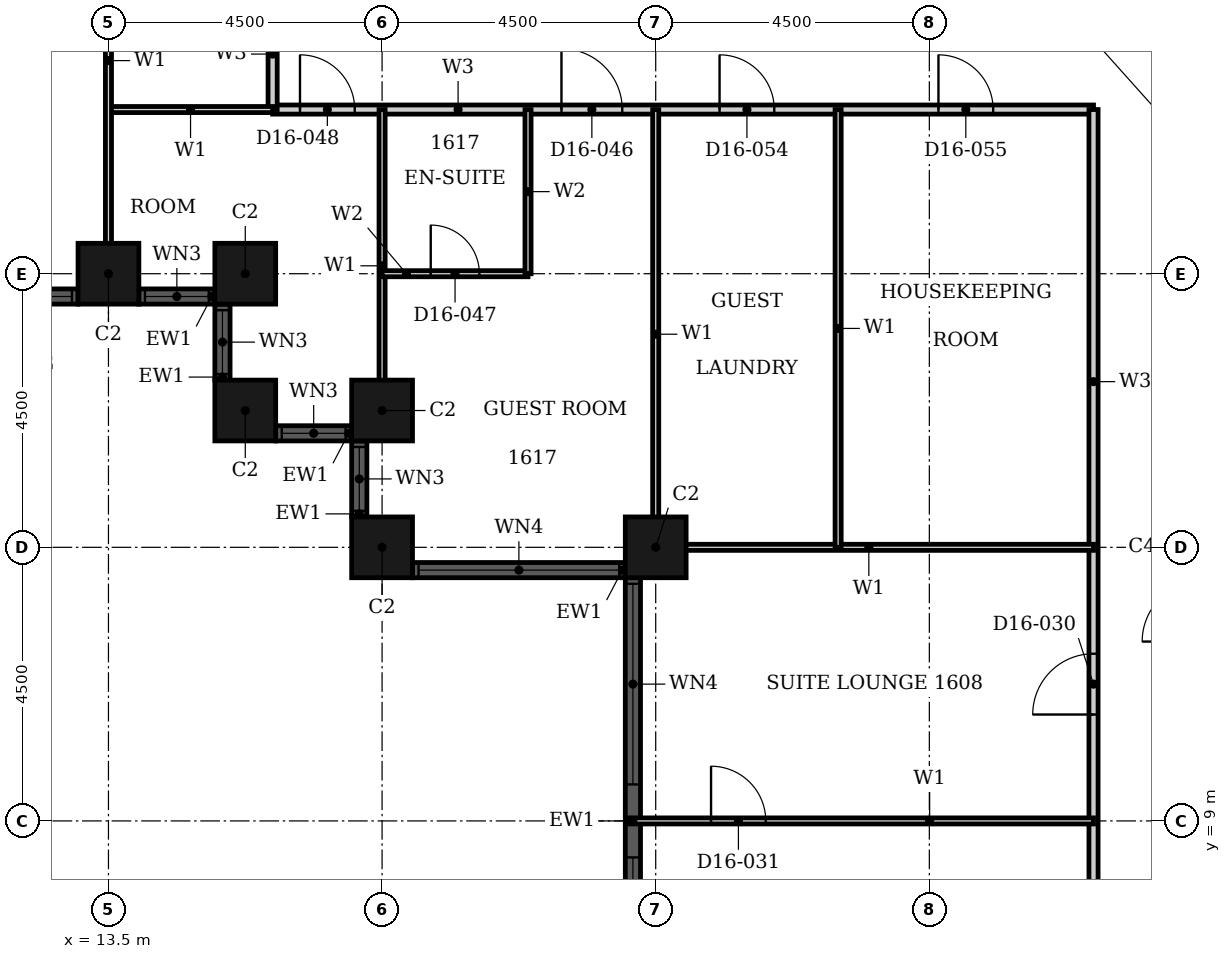
"""IFC4 building model, lengths in metres.
Left out: names, types, materials, properties, quantities, classifications, styles, units other than length and angle.
Written with IfcOpenShell. Run it as: python <this file> out.ifc"""

import sys

from ifc_helpers import new_model, si_unit, direction, frame, frame_2d, origin, origin_2d, place, context, subcontext, project, spatial, rectangle, hollow_rectangle, extrude, element, fill, save


model = new_model("IFC4")
c1 = context("Model", 3, precision=1e-05, world=origin(), true_north=direction((0.0, 1.0)))
c2 = subcontext(c1, "Body", "Model", "MODEL_VIEW")
j1 = project(units=[si_unit("LENGTHUNIT", "METRE"), si_unit("PLANEANGLEUNIT", "RADIAN")], contexts=[c1])
p1 = place(None, origin())
s1 = spatial("IfcSite", under=j1, at=p1, CompositionType="ELEMENT")
p2 = place(p1, origin())
s2 = spatial("IfcBuilding", under=s1, at=p2, CompositionType="ELEMENT")
p3 = place(p2, frame((0.0, 0.0, 70.8)))
s3 = spatial("IfcBuildingStorey", under=s2, at=p3, CompositionType="ELEMENT", Elevation=70.8)
for number, where, z_axis, x_axis in (
    (1, (13.5, 18.0, 0.0), (0.0, 0.0, 1.0), (1.0, 0.0, 0.0)),
    (2, (15.75, 18.0, 0.0), (0.0, 0.0, 1.0), (1.0, 0.0, 0.0)),
    (3, (15.75, 15.75, 0.0), (0.0, 0.0, 1.0), (1.0, 0.0, 0.0)),
    (4, (18.0, 15.75, 0.0), (0.0, 0.0, 1.0), (1.0, 0.0, 0.0)),
    (5, (18.0, 13.5, 0.0), (0.0, 0.0, 1.0), (1.0, 0.0, 0.0)),
    (6, (22.5, 13.5, 0.0), (0.0, 0.0, 1.0), (1.0, 0.0, 0.0)),
):
    element("IfcColumn", number, at=place(p3, frame(where, z_axis=z_axis, x_axis=x_axis)), inside=s3, PredefinedType="COLUMN", context=c2, shape_type="SweptSolid", body=[
        extrude(hollow_rectangle(XDim=1.0, YDim=1.0, WallThickness=0.032, at=origin_2d()), origin(), (0.0, 0.0, 1.0), 3.6),
    ])
p4 = place(p3, frame((5.0, 17.625, 0.0), z_axis=(0.0, 0.0, 1.0), x_axis=(1.0, 0.0, 0.0)))
e7 = element("IfcWall", 7, at=p4, inside=s3, PredefinedType="SOLIDWALL", context=c2, shape_type="SweptSolid", body=[
    extrude(rectangle(XDim=8.0, YDim=0.25, at=frame_2d((4.0, 0.0))), origin(), (0.0, 0.0, 1.0), 3.6),
])
p5 = place(p4, frame((0.1, 0.0, 0.9)))
e8 = element("IfcOpeningElement", 8, at=p5, cuts=e7, PredefinedType="OPENING", context=c2, shape_type="SweptSolid", body=[
    extrude(rectangle(XDim=3.3, YDim=2.08, at=frame_2d((1.65, 1.04))), frame((0.0, 0.135, 0.0), z_axis=(0.0, -1.0, 0.0), x_axis=(1.0, 0.0, 0.0)), (0.0, 0.0, 1.0), 0.27),
])
p6 = place(p4, frame((4.6, 0.0, 0.9)))
e9 = element("IfcOpeningElement", 9, at=p6, cuts=e7, PredefinedType="OPENING", context=c2, shape_type="SweptSolid", body=[
    extrude(rectangle(XDim=3.3, YDim=2.08, at=frame_2d((1.65, 1.04))), frame((0.0, 0.135, 0.0), z_axis=(0.0, -1.0, 0.0), x_axis=(1.0, 0.0, 0.0)), (0.0, 0.0, 1.0), 0.27),
])
p7 = place(p3, frame((14.0, 17.625, 0.0), z_axis=(0.0, 0.0, 1.0), x_axis=(1.0, 0.0, 0.0)))
e10 = element("IfcWall", 10, at=p7, inside=s3, PredefinedType="SOLIDWALL", context=c2, shape_type="SweptSolid", body=[
    extrude(rectangle(XDim=1.25, YDim=0.25, at=frame_2d((0.625, 0.0))), origin(), (0.0, 0.0, 1.0), 3.6),
])
p8 = place(p7, frame((0.1, 0.0, 0.9)))
e11 = element("IfcOpeningElement", 11, at=p8, cuts=e10, PredefinedType="OPENING", context=c2, shape_type="SweptSolid", body=[
    extrude(rectangle(XDim=1.05, YDim=2.08, at=frame_2d((0.525, 1.04))), frame((0.0, 0.135, 0.0), z_axis=(0.0, -1.0, 0.0), x_axis=(1.0, 0.0, 0.0)), (0.0, 0.0, 1.0), 0.27),
])
p9 = place(p3, frame((15.375, 17.5, 0.0), z_axis=(0.0, 0.0, 1.0), x_axis=(0.0, -1.0, 0.0)))
e12 = element("IfcWall", 12, at=p9, inside=s3, PredefinedType="SOLIDWALL", context=c2, shape_type="SweptSolid", body=[
    extrude(rectangle(XDim=1.25, YDim=0.25, at=frame_2d((0.625, 0.0))), origin(), (0.0, 0.0, 1.0), 3.6),
])
p10 = place(p9, frame((0.1, 0.0, 0.9)))
e13 = element("IfcOpeningElement", 13, at=p10, cuts=e12, PredefinedType="OPENING", context=c2, shape_type="SweptSolid", body=[
    extrude(rectangle(XDim=1.05, YDim=2.08, at=frame_2d((0.525, 1.04))), frame((0.0, 0.135, 0.0), z_axis=(0.0, -1.0, 0.0), x_axis=(1.0, 0.0, 0.0)), (0.0, 0.0, 1.0), 0.27),
])
p11 = place(p3, frame((16.25, 15.375, 0.0), z_axis=(0.0, 0.0, 1.0), x_axis=(1.0, 0.0, 0.0)))
e14 = element("IfcWall", 14, at=p11, inside=s3, PredefinedType="SOLIDWALL", context=c2, shape_type="SweptSolid", body=[
    extrude(rectangle(XDim=1.25, YDim=0.25, at=frame_2d((0.625, 0.0))), origin(), (0.0, 0.0, 1.0), 3.6),
])
p12 = place(p11, frame((0.1, 0.0, 0.9)))
e15 = element("IfcOpeningElement", 15, at=p12, cuts=e14, PredefinedType="OPENING", context=c2, shape_type="SweptSolid", body=[
    extrude(rectangle(XDim=1.05, YDim=2.08, at=frame_2d((0.525, 1.04))), frame((0.0, 0.135, 0.0), z_axis=(0.0, -1.0, 0.0), x_axis=(1.0, 0.0, 0.0)), (0.0, 0.0, 1.0), 0.27),
])
p13 = place(p3, frame((17.625, 15.25, 0.0), z_axis=(0.0, 0.0, 1.0), x_axis=(0.0, -1.0, 0.0)))
e16 = element("IfcWall", 16, at=p13, inside=s3, PredefinedType="SOLIDWALL", context=c2, shape_type="SweptSolid", body=[
    extrude(rectangle(XDim=1.25, YDim=0.25, at=frame_2d((0.625, 0.0))), origin(), (0.0, 0.0, 1.0), 3.6),
])
p14 = place(p13, frame((0.1, 0.0, 0.9)))
e17 = element("IfcOpeningElement", 17, at=p14, cuts=e16, PredefinedType="OPENING", context=c2, shape_type="SweptSolid", body=[
    extrude(rectangle(XDim=1.05, YDim=2.08, at=frame_2d((0.525, 1.04))), frame((0.0, 0.135, 0.0), z_axis=(0.0, -1.0, 0.0), x_axis=(1.0, 0.0, 0.0)), (0.0, 0.0, 1.0), 0.27),
])
p15 = place(p3, frame((18.5, 13.125, 0.0), z_axis=(0.0, 0.0, 1.0), x_axis=(1.0, 0.0, 0.0)))
e18 = element("IfcWall", 18, at=p15, inside=s3, PredefinedType="SOLIDWALL", context=c2, shape_type="SweptSolid", body=[
    extrude(rectangle(XDim=3.5, YDim=0.25, at=frame_2d((1.75, 0.0))), origin(), (0.0, 0.0, 1.0), 3.6),
])
p16 = place(p15, frame((0.1, 0.0, 0.9)))
e19 = element("IfcOpeningElement", 19, at=p16, cuts=e18, PredefinedType="OPENING", context=c2, shape_type="SweptSolid", body=[
    extrude(rectangle(XDim=3.3, YDim=2.08, at=frame_2d((1.65, 1.04))), frame((0.0, 0.135, 0.0), z_axis=(0.0, -1.0, 0.0), x_axis=(1.0, 0.0, 0.0)), (0.0, 0.0, 1.0), 0.27),
])
p17 = place(p3, frame((22.125, 13.0, 0.0), z_axis=(0.0, 0.0, 1.0), x_axis=(0.0, -1.0, 0.0)))
e20 = element("IfcWall", 20, at=p17, inside=s3, PredefinedType="SOLIDWALL", context=c2, shape_type="SweptSolid", body=[
    extrude(rectangle(XDim=8.0, YDim=0.25, at=frame_2d((4.0, 0.0))), origin(), (0.0, 0.0, 1.0), 3.6),
])
p18 = place(p17, frame((0.1, 0.0, 0.9)))
e21 = element("IfcOpeningElement", 21, at=p18, cuts=e20, PredefinedType="OPENING", context=c2, shape_type="SweptSolid", body=[
    extrude(rectangle(XDim=3.3, YDim=2.08, at=frame_2d((1.65, 1.04))), frame((0.0, 0.135, 0.0), z_axis=(0.0, -1.0, 0.0), x_axis=(1.0, 0.0, 0.0)), (0.0, 0.0, 1.0), 0.27),
])
p19 = place(p17, frame((4.6, 0.0, 0.9)))
e22 = element("IfcOpeningElement", 22, at=p19, cuts=e20, PredefinedType="OPENING", context=c2, shape_type="SweptSolid", body=[
    extrude(rectangle(XDim=3.3, YDim=2.08, at=frame_2d((1.65, 1.04))), frame((0.0, 0.135, 0.0), z_axis=(0.0, -1.0, 0.0), x_axis=(1.0, 0.0, 0.0)), (0.0, 0.0, 1.0), 0.27),
])
p20 = place(p3, frame((16.2, 20.7, 0.0), z_axis=(0.0, 0.0, 1.0), x_axis=(1.0, 0.0, 0.0)))
e23 = element("IfcWall", 23, at=p20, inside=s3, PredefinedType="PARTITIONING", context=c2, shape_type="SweptSolid", body=[
    extrude(rectangle(XDim=13.5, YDim=0.15, at=frame_2d((6.75, 0.0))), origin(), (0.0, 0.0, 1.0), 3.3),
])
p21 = place(p20, frame((4.75, 0.0, 0.0)))
e24 = element("IfcOpeningElement", 24, at=p21, cuts=e23, PredefinedType="OPENING", context=c2, shape_type="SweptSolid", body=[
    extrude(rectangle(XDim=1.0, YDim=2.1, at=frame_2d((0.5, 1.05))), frame((0.0, 0.085, 0.0), z_axis=(0.0, -1.0, 0.0), x_axis=(1.0, 0.0, 0.0)), (0.0, 0.0, 1.0), 0.17),
])
p22 = place(p20, frame((0.45, 0.0, 0.0)))
e25 = element("IfcOpeningElement", 25, at=p22, cuts=e23, PredefinedType="OPENING", context=c2, shape_type="SweptSolid", body=[
    extrude(rectangle(XDim=0.9, YDim=2.1, at=frame_2d((0.45, 1.05))), frame((0.0, 0.085, 0.0), z_axis=(0.0, -1.0, 0.0), x_axis=(1.0, 0.0, 0.0)), (0.0, 0.0, 1.0), 0.17),
])
p23 = place(p20, frame((7.35, 0.0, 0.0)))
e26 = element("IfcOpeningElement", 26, at=p23, cuts=e23, PredefinedType="OPENING", context=c2, shape_type="SweptSolid", body=[
    extrude(rectangle(XDim=0.9, YDim=2.1, at=frame_2d((0.45, 1.05))), frame((0.0, 0.085, 0.0), z_axis=(0.0, -1.0, 0.0), x_axis=(1.0, 0.0, 0.0)), (0.0, 0.0, 1.0), 0.17),
])
p24 = place(p20, frame((10.95, 0.0, 0.0)))
e27 = element("IfcOpeningElement", 27, at=p24, cuts=e23, PredefinedType="OPENING", context=c2, shape_type="SweptSolid", body=[
    extrude(rectangle(XDim=0.9, YDim=2.1, at=frame_2d((0.45, 1.05))), frame((0.0, 0.085, 0.0), z_axis=(0.0, -1.0, 0.0), x_axis=(1.0, 0.0, 0.0)), (0.0, 0.0, 1.0), 0.17),
])
p25 = place(p3, frame((16.2, 20.7, 0.0), z_axis=(0.0, 0.0, 1.0), x_axis=(0.0, 1.0, 0.0)))
e28 = element("IfcWall", 28, at=p25, inside=s3, PredefinedType="PARTITIONING", context=c2, shape_type="SweptSolid", body=[
    extrude(rectangle(XDim=4.5, YDim=0.15, at=frame_2d((2.25, 0.0))), origin(), (0.0, 0.0, 1.0), 3.3),
])
p26 = place(p25, frame((1.825, 0.0, 0.0)))
e29 = element("IfcOpeningElement", 29, at=p26, cuts=e28, PredefinedType="OPENING", context=c2, shape_type="SweptSolid", body=[
    extrude(rectangle(XDim=0.95, YDim=2.1, at=frame_2d((0.475, 1.05))), frame((0.0, 0.085, 0.0), z_axis=(0.0, -1.0, 0.0), x_axis=(1.0, 0.0, 0.0)), (0.0, 0.0, 1.0), 0.17),
])
p27 = place(p3, frame((29.7, 4.5, 0.0), z_axis=(0.0, 0.0, 1.0), x_axis=(0.0, 1.0, 0.0)))
e30 = element("IfcWall", 30, at=p27, inside=s3, PredefinedType="PARTITIONING", context=c2, shape_type="SweptSolid", body=[
    extrude(rectangle(XDim=16.2, YDim=0.15, at=frame_2d((8.1, 0.0))), origin(), (0.0, 0.0, 1.0), 3.3),
])
p28 = place(p27, frame((6.25, 0.0, 0.0)))
e31 = element("IfcOpeningElement", 31, at=p28, cuts=e30, PredefinedType="OPENING", context=c2, shape_type="SweptSolid", body=[
    extrude(rectangle(XDim=1.0, YDim=2.1, at=frame_2d((0.5, 1.05))), frame((0.0, 0.085, 0.0), z_axis=(0.0, -1.0, 0.0), x_axis=(1.0, 0.0, 0.0)), (0.0, 0.0, 1.0), 0.17),
])
p29 = place(p3, frame((22.31, 13.5, 0.0), z_axis=(0.0, 0.0, 1.0), x_axis=(1.0, 0.0, 0.0)))
e32 = element("IfcWall", 32, at=p29, inside=s3, PredefinedType="PARTITIONING", context=c2, shape_type="SweptSolid", body=[
    extrude(rectangle(XDim=7.39, YDim=0.1, at=frame_2d((3.695, 0.0))), origin(), (0.0, 0.0, 1.0), 2.38),
])
p30 = place(p3, frame((13.5, 20.7, 0.0), z_axis=(0.0, 0.0, 1.0), x_axis=(1.0, 0.0, 0.0)))
e33 = element("IfcWall", 33, at=p30, inside=s3, PredefinedType="PARTITIONING", context=c2, shape_type="SweptSolid", body=[
    extrude(rectangle(XDim=2.7, YDim=0.1, at=frame_2d((1.35, 0.0))), origin(), (0.0, 0.0, 1.0), 3.3),
])
p31 = place(p3, frame((22.06, 9.0, 0.0), z_axis=(0.0, 0.0, 1.0), x_axis=(1.0, 0.0, 0.0)))
e34 = element("IfcWall", 34, at=p31, inside=s3, PredefinedType="PARTITIONING", context=c2, shape_type="SweptSolid", body=[
    extrude(rectangle(XDim=7.64, YDim=0.1, at=frame_2d((3.82, 0.0))), origin(), (0.0, 0.0, 1.0), 3.3),
])
p32 = place(p31, frame((1.35, 0.0, 0.0)))
e35 = element("IfcOpeningElement", 35, at=p32, cuts=e34, PredefinedType="OPENING", context=c2, shape_type="SweptSolid", body=[
    extrude(rectangle(XDim=0.9, YDim=2.1, at=frame_2d((0.45, 1.05))), frame((0.0, 0.06, 0.0), z_axis=(0.0, -1.0, 0.0), x_axis=(1.0, 0.0, 0.0)), (0.0, 0.0, 1.0), 0.12),
])
p33 = place(p3, frame((13.5, 17.81, 0.0), z_axis=(0.0, 0.0, 1.0), x_axis=(0.0, 1.0, 0.0)))
e36 = element("IfcWall", 36, at=p33, inside=s3, PredefinedType="PARTITIONING", context=c2, shape_type="SweptSolid", body=[
    extrude(rectangle(XDim=7.39, YDim=0.1, at=frame_2d((3.695, 0.0))), origin(), (0.0, 0.0, 1.0), 2.38),
])
p34 = place(p3, frame((18.0, 15.56, 0.0), z_axis=(0.0, 0.0, 1.0), x_axis=(0.0, 1.0, 0.0)))
e37 = element("IfcWall", 37, at=p34, inside=s3, PredefinedType="PARTITIONING", context=c2, shape_type="SweptSolid", body=[
    extrude(rectangle(XDim=5.14, YDim=0.1, at=frame_2d((2.57, 0.0))), origin(), (0.0, 0.0, 1.0), 3.3),
])
p35 = place(p3, frame((22.5, 13.31, 0.0), z_axis=(0.0, 0.0, 1.0), x_axis=(0.0, 1.0, 0.0)))
e38 = element("IfcWall", 38, at=p35, inside=s3, PredefinedType="PARTITIONING", context=c2, shape_type="SweptSolid", body=[
    extrude(rectangle(XDim=7.39, YDim=0.1, at=frame_2d((3.695, 0.0))), origin(), (0.0, 0.0, 1.0), 3.3),
])
p36 = place(p3, frame((25.5, 13.5, 0.0), z_axis=(0.0, 0.0, 1.0), x_axis=(0.0, 1.0, 0.0)))
e39 = element("IfcWall", 39, at=p36, inside=s3, PredefinedType="PARTITIONING", context=c2, shape_type="SweptSolid", body=[
    extrude(rectangle(XDim=7.2, YDim=0.1, at=frame_2d((3.6, 0.0))), origin(), (0.0, 0.0, 1.0), 3.3),
])
p37 = place(p3, frame((18.0, 18.0, 0.0), z_axis=(0.0, 0.0, 1.0), x_axis=(1.0, 0.0, 0.0)))
e40 = element("IfcWall", 40, at=p37, inside=s3, PredefinedType="PARTITIONING", context=c2, shape_type="SweptSolid", body=[
    extrude(rectangle(XDim=2.4, YDim=0.1, at=frame_2d((1.2, 0.0))), origin(), (0.0, 0.0, 1.0), 3.3),
])
p38 = place(p37, frame((0.8, 0.0, 0.0)))
e41 = element("IfcOpeningElement", 41, at=p38, cuts=e40, PredefinedType="OPENING", context=c2, shape_type="SweptSolid", body=[
    extrude(rectangle(XDim=0.8, YDim=2.1, at=frame_2d((0.4, 1.05))), frame((0.0, 0.06, 0.0), z_axis=(0.0, -1.0, 0.0), x_axis=(1.0, 0.0, 0.0)), (0.0, 0.0, 1.0), 0.12),
])
p39 = place(p3, frame((20.4, 18.0, 0.0), z_axis=(0.0, 0.0, 1.0), x_axis=(0.0, 1.0, 0.0)))
e42 = element("IfcWall", 42, at=p39, inside=s3, PredefinedType="PARTITIONING", context=c2, shape_type="SweptSolid", body=[
    extrude(rectangle(XDim=2.7, YDim=0.1, at=frame_2d((1.35, 0.0))), origin(), (0.0, 0.0, 1.0), 3.3),
])
p40 = place(p6, origin())
e43 = element("IfcWindow", 43, at=p40, inside=s3, PartitioningType="SINGLE_PANEL", PredefinedType="WINDOW", context=c2, shape_type="SweptSolid", body=[
    extrude(rectangle(XDim=3.3, YDim=2.08, at=frame_2d((1.65, 1.04))), frame((0.0, 0.03, 0.0), z_axis=(0.0, -1.0, 0.0), x_axis=(1.0, 0.0, 0.0)), (0.0, 0.0, 1.0), 0.06),
])
fill(e9, e43)
p41 = place(p8, origin())
e44 = element("IfcWindow", 44, at=p41, inside=s3, PartitioningType="SINGLE_PANEL", PredefinedType="WINDOW", context=c2, shape_type="SweptSolid", body=[
    extrude(rectangle(XDim=1.05, YDim=2.08, at=frame_2d((0.525, 1.04))), frame((0.0, 0.03, 0.0), z_axis=(0.0, -1.0, 0.0), x_axis=(1.0, 0.0, 0.0)), (0.0, 0.0, 1.0), 0.06),
])
fill(e11, e44)
p42 = place(p10, origin())
e45 = element("IfcWindow", 45, at=p42, inside=s3, PartitioningType="SINGLE_PANEL", PredefinedType="WINDOW", context=c2, shape_type="SweptSolid", body=[
    extrude(rectangle(XDim=1.05, YDim=2.08, at=frame_2d((0.525, 1.04))), frame((0.0, 0.03, 0.0), z_axis=(0.0, -1.0, 0.0), x_axis=(1.0, 0.0, 0.0)), (0.0, 0.0, 1.0), 0.06),
])
fill(e13, e45)
p43 = place(p12, origin())
e46 = element("IfcWindow", 46, at=p43, inside=s3, PartitioningType="SINGLE_PANEL", PredefinedType="WINDOW", context=c2, shape_type="SweptSolid", body=[
    extrude(rectangle(XDim=1.05, YDim=2.08, at=frame_2d((0.525, 1.04))), frame((0.0, 0.03, 0.0), z_axis=(0.0, -1.0, 0.0), x_axis=(1.0, 0.0, 0.0)), (0.0, 0.0, 1.0), 0.06),
])
fill(e15, e46)
p44 = place(p14, origin())
e47 = element("IfcWindow", 47, at=p44, inside=s3, PartitioningType="SINGLE_PANEL", PredefinedType="WINDOW", context=c2, shape_type="SweptSolid", body=[
    extrude(rectangle(XDim=1.05, YDim=2.08, at=frame_2d((0.525, 1.04))), frame((0.0, 0.03, 0.0), z_axis=(0.0, -1.0, 0.0), x_axis=(1.0, 0.0, 0.0)), (0.0, 0.0, 1.0), 0.06),
])
fill(e17, e47)
p45 = place(p16, origin())
e48 = element("IfcWindow", 48, at=p45, inside=s3, PartitioningType="SINGLE_PANEL", PredefinedType="WINDOW", context=c2, shape_type="SweptSolid", body=[
    extrude(rectangle(XDim=3.3, YDim=2.08, at=frame_2d((1.65, 1.04))), frame((0.0, 0.03, 0.0), z_axis=(0.0, -1.0, 0.0), x_axis=(1.0, 0.0, 0.0)), (0.0, 0.0, 1.0), 0.06),
])
fill(e19, e48)
p46 = place(p18, origin())
e49 = element("IfcWindow", 49, at=p46, inside=s3, PartitioningType="SINGLE_PANEL", PredefinedType="WINDOW", context=c2, shape_type="SweptSolid", body=[
    extrude(rectangle(XDim=3.3, YDim=2.08, at=frame_2d((1.65, 1.04))), frame((0.0, 0.03, 0.0), z_axis=(0.0, -1.0, 0.0), x_axis=(1.0, 0.0, 0.0)), (0.0, 0.0, 1.0), 0.06),
])
fill(e21, e49)
p47 = place(p19, origin())
e50 = element("IfcWindow", 50, at=p47, inside=s3, PartitioningType="SINGLE_PANEL", PredefinedType="WINDOW", context=c2, shape_type="SweptSolid", body=[
    extrude(rectangle(XDim=3.3, YDim=2.08, at=frame_2d((1.65, 1.04))), frame((0.0, 0.03, 0.0), z_axis=(0.0, -1.0, 0.0), x_axis=(1.0, 0.0, 0.0)), (0.0, 0.0, 1.0), 0.06),
])
fill(e22, e50)
p48 = place(p28, origin())
e51 = element("IfcDoor", 51, at=p48, inside=s3, OperationType="SINGLE_SWING_RIGHT", PredefinedType="DOOR", context=c2, shape_type="SweptSolid", body=[
    extrude(rectangle(XDim=1.0, YDim=2.1, at=frame_2d((0.5, 1.05))), frame((0.0, 0.025, 0.0), z_axis=(0.0, -1.0, 0.0), x_axis=(1.0, 0.0, 0.0)), (0.0, 0.0, 1.0), 0.05),
])
fill(e31, e51)
p49 = place(p32, origin())
e52 = element("IfcDoor", 52, at=p49, inside=s3, OperationType="SINGLE_SWING_LEFT", PredefinedType="DOOR", context=c2, shape_type="SweptSolid", body=[
    extrude(rectangle(XDim=0.9, YDim=2.1, at=frame_2d((0.45, 1.05))), frame((0.0, 0.025, 0.0), z_axis=(0.0, -1.0, 0.0), x_axis=(1.0, 0.0, 0.0)), (0.0, 0.0, 1.0), 0.05),
])
fill(e35, e52)
p50 = place(p21, origin())
e53 = element("IfcDoor", 53, at=p50, inside=s3, OperationType="SINGLE_SWING_RIGHT", PredefinedType="DOOR", context=c2, shape_type="SweptSolid", body=[
    extrude(rectangle(XDim=1.0, YDim=2.1, at=frame_2d((0.5, 1.05))), frame((0.0, 0.025, 0.0), z_axis=(0.0, -1.0, 0.0), x_axis=(1.0, 0.0, 0.0)), (0.0, 0.0, 1.0), 0.05),
])
fill(e24, e53)
p51 = place(p38, origin())
e54 = element("IfcDoor", 54, at=p51, inside=s3, OperationType="SINGLE_SWING_RIGHT", PredefinedType="DOOR", context=c2, shape_type="SweptSolid", body=[
    extrude(rectangle(XDim=0.8, YDim=2.1, at=frame_2d((0.4, 1.05))), frame((0.0, 0.025, 0.0), z_axis=(0.0, -1.0, 0.0), x_axis=(1.0, 0.0, 0.0)), (0.0, 0.0, 1.0), 0.05),
])
fill(e41, e54)
p52 = place(p22, origin())
e55 = element("IfcDoor", 55, at=p52, inside=s3, OperationType="SINGLE_SWING_RIGHT", PredefinedType="DOOR", context=c2, shape_type="SweptSolid", body=[
    extrude(rectangle(XDim=0.9, YDim=2.1, at=frame_2d((0.45, 1.05))), frame((0.0, 0.025, 0.0), z_axis=(0.0, -1.0, 0.0), x_axis=(1.0, 0.0, 0.0)), (0.0, 0.0, 1.0), 0.05),
])
fill(e25, e55)
p53 = place(p23, origin())
e56 = element("IfcDoor", 56, at=p53, inside=s3, OperationType="SINGLE_SWING_LEFT", PredefinedType="DOOR", context=c2, shape_type="SweptSolid", body=[
    extrude(rectangle(XDim=0.9, YDim=2.1, at=frame_2d((0.45, 1.05))), frame((0.0, 0.025, 0.0), z_axis=(0.0, -1.0, 0.0), x_axis=(1.0, 0.0, 0.0)), (0.0, 0.0, 1.0), 0.05),
])
fill(e26, e56)
p54 = place(p24, origin())
e57 = element("IfcDoor", 57, at=p54, inside=s3, OperationType="SINGLE_SWING_RIGHT", PredefinedType="DOOR", context=c2, shape_type="SweptSolid", body=[
    extrude(rectangle(XDim=0.9, YDim=2.1, at=frame_2d((0.45, 1.05))), frame((0.0, 0.025, 0.0), z_axis=(0.0, -1.0, 0.0), x_axis=(1.0, 0.0, 0.0)), (0.0, 0.0, 1.0), 0.05),
])
fill(e27, e57)
save(model, sys.argv[1])
